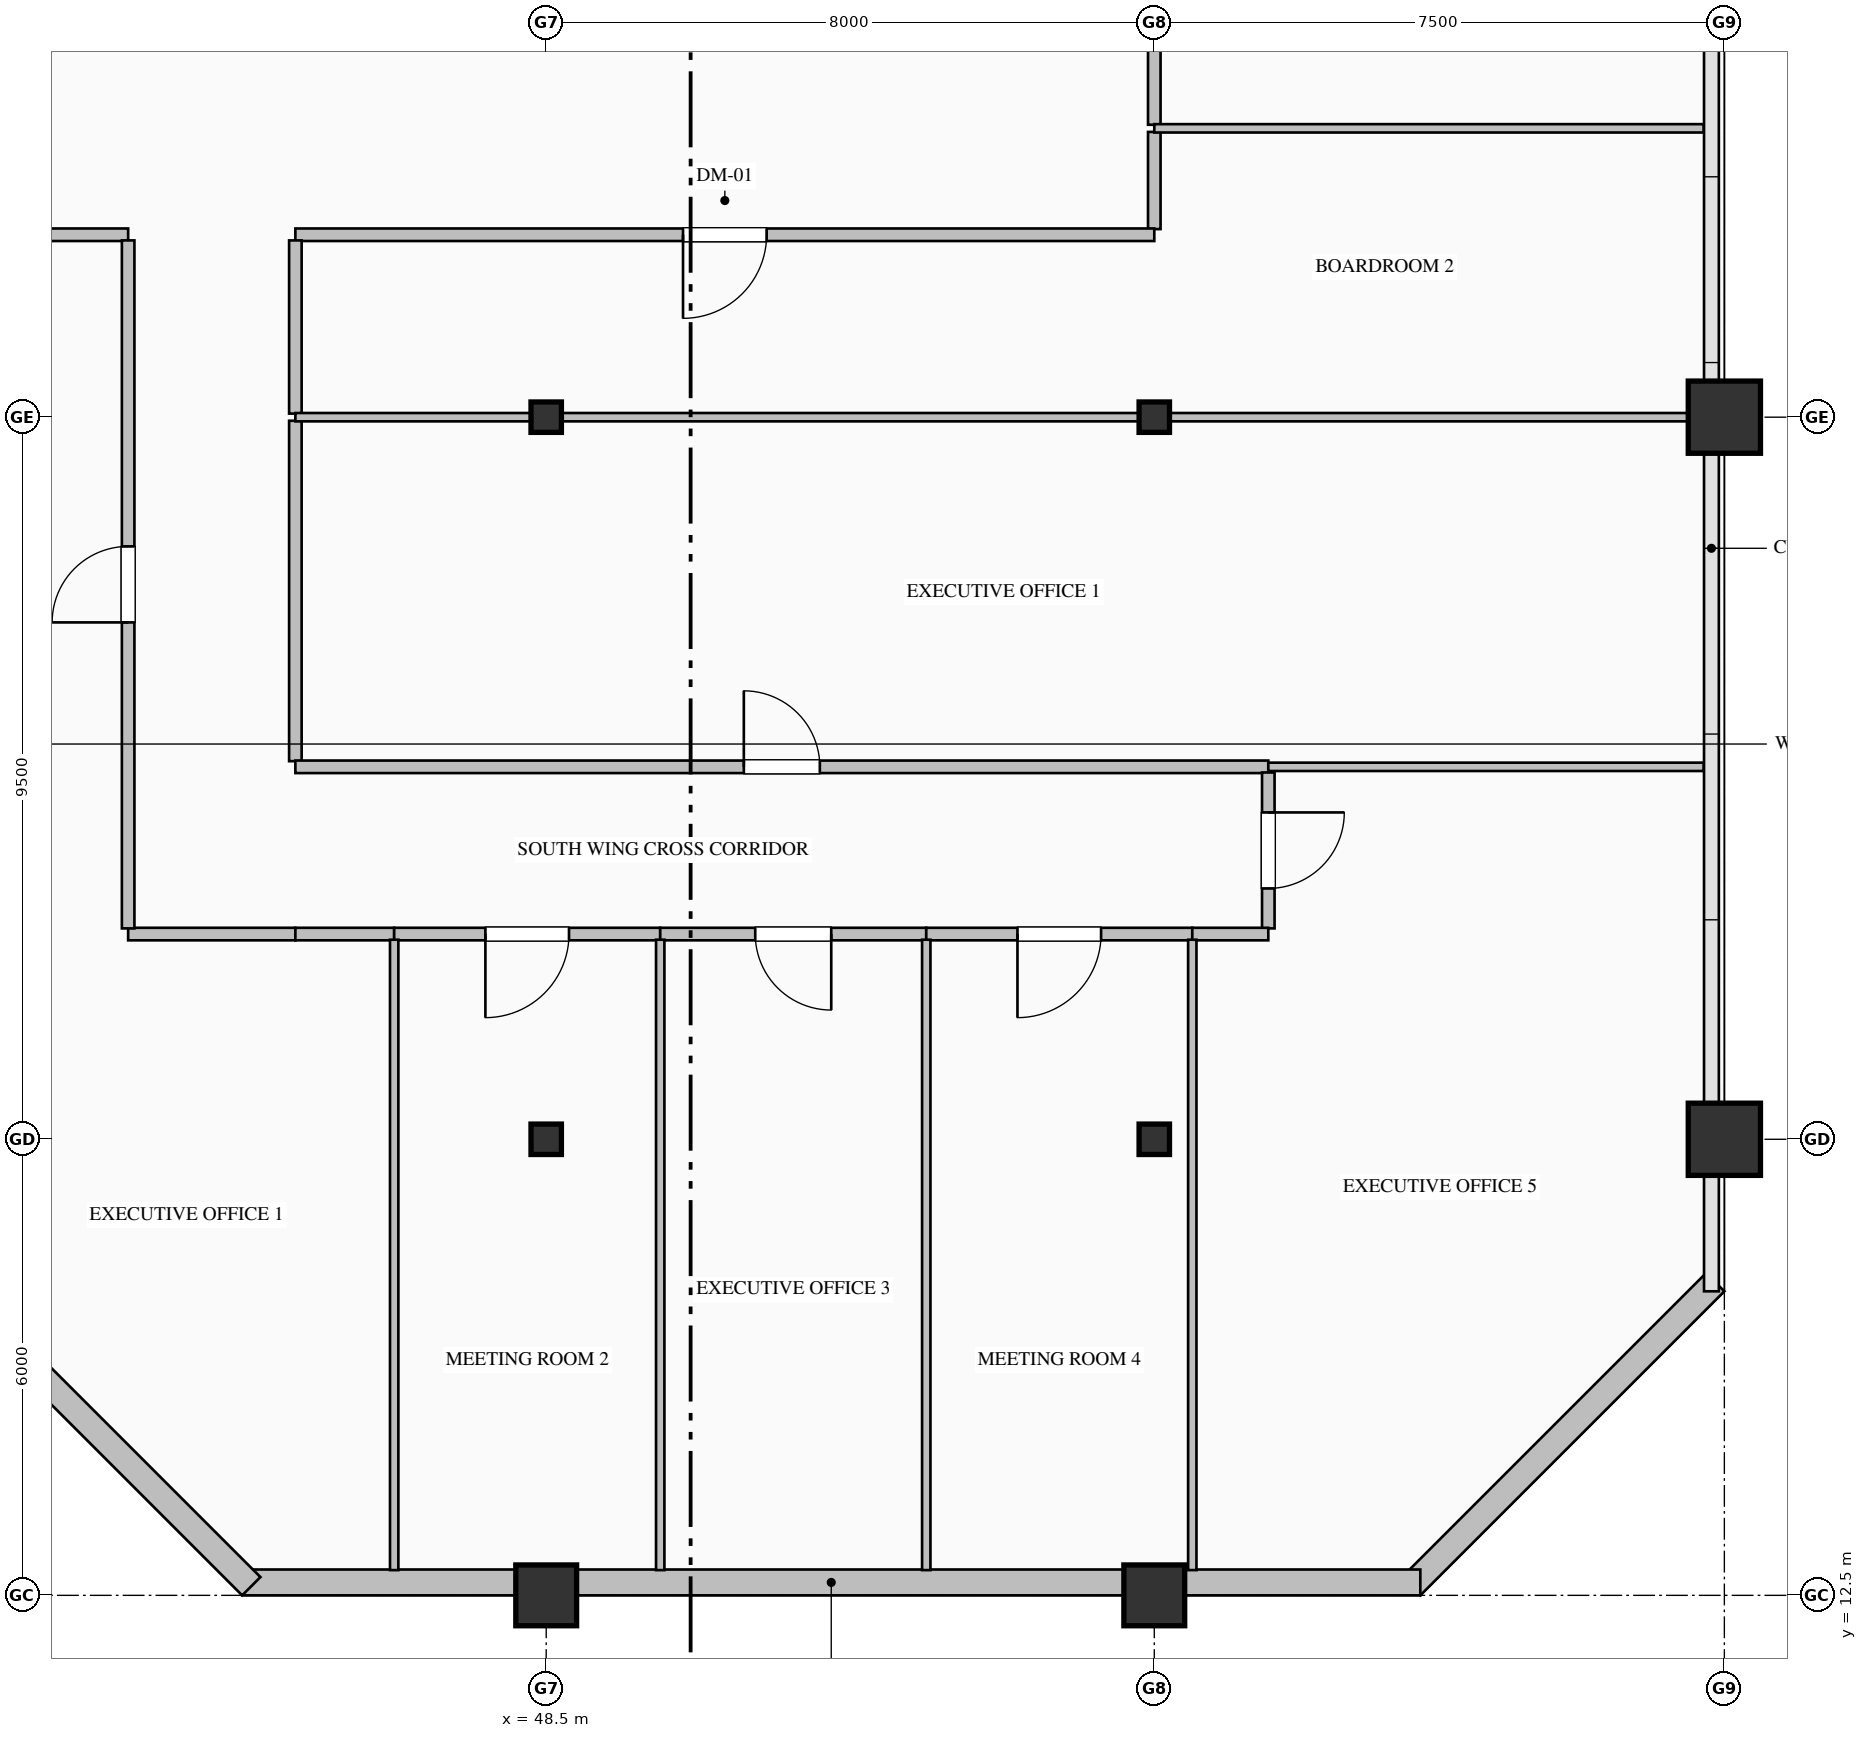
"""IFC4 building model, lengths in metres.
Left out: names, types, materials, properties, quantities, classifications, styles, units other than length and angle.
Written with IfcOpenShell. Run it as: python <this file> out.ifc"""

import sys

from ifc_helpers import new_model, si_unit, direction, frame, frame_2d, origin, origin_2d, place, context, subcontext, project, spatial, rectangle, hollow_rectangle, i_section, extrude, element, fill, save


model = new_model("IFC4")
c1 = context("Model", 3, precision=1e-05, world=origin(), true_north=direction((0.0, 1.0)))
c2 = subcontext(c1, "Body", "Model", "MODEL_VIEW")
j1 = project(units=[si_unit("LENGTHUNIT", "METRE"), si_unit("PLANEANGLEUNIT", "RADIAN")], contexts=[c1])
p1 = place(None, origin())
s1 = spatial("IfcSite", under=j1, at=p1, CompositionType="ELEMENT")
p2 = place(p1, origin())
s2 = spatial("IfcBuilding", under=s1, at=p2, CompositionType="ELEMENT")
p3 = place(p2, frame((0.0, 0.0, 213.8)))
s3 = spatial("IfcBuildingStorey", under=s2, at=p3, CompositionType="ELEMENT", Elevation=213.8)
p4 = place(p3, frame((48.5, 12.5, 0.0), z_axis=(0.0, 0.0, 1.0), x_axis=(1.0, 0.0, 0.0)))
e1 = element("IfcColumn", 1, at=p4, inside=s3, PredefinedType="COLUMN", context=c2, shape_type="SweptSolid", body=[
    extrude(hollow_rectangle(XDim=0.8, YDim=0.8, WallThickness=0.032, at=origin_2d()), origin(), (0.0, 0.0, 1.0), 4.0),
])
for number, where, z_axis, x_axis in (
    (2, (48.5, 18.5, 0.0), (0.0, 0.0, 1.0), (1.0, 0.0, 0.0)),
    (3, (48.5, 28.0, 0.0), (0.0, 0.0, 1.0), (1.0, 0.0, 0.0)),
):
    element("IfcColumn", number, at=place(p3, frame(where, z_axis=z_axis, x_axis=x_axis)), inside=s3, PredefinedType="COLUMN", context=c2, shape_type="SweptSolid", body=[
        extrude(i_section(OverallWidth=0.4, OverallDepth=0.4, WebThickness=0.013, FlangeThickness=0.021, FilletRadius=0.022, at=origin_2d()), origin(), (0.0, 0.0, 1.0), 4.0),
    ])
p5 = place(p3, frame((56.5, 12.5, 0.0), z_axis=(0.0, 0.0, 1.0), x_axis=(1.0, 0.0, 0.0)))
e4 = element("IfcColumn", 4, at=p5, inside=s3, PredefinedType="COLUMN", context=c2, shape_type="SweptSolid", body=[
    extrude(hollow_rectangle(XDim=0.8, YDim=0.8, WallThickness=0.032, at=origin_2d()), origin(), (0.0, 0.0, 1.0), 4.0),
])
for number, where, z_axis, x_axis in (
    (5, (56.5, 18.5, 0.0), (0.0, 0.0, 1.0), (1.0, 0.0, 0.0)),
    (6, (56.5, 28.0, 0.0), (0.0, 0.0, 1.0), (1.0, 0.0, 0.0)),
):
    element("IfcColumn", number, at=place(p3, frame(where, z_axis=z_axis, x_axis=x_axis)), inside=s3, PredefinedType="COLUMN", context=c2, shape_type="SweptSolid", body=[
        extrude(i_section(OverallWidth=0.4, OverallDepth=0.4, WebThickness=0.013, FlangeThickness=0.021, FilletRadius=0.022, at=origin_2d()), origin(), (0.0, 0.0, 1.0), 4.0),
    ])
for number, where, z_axis, x_axis in (
    (7, (64.0, 18.5, 0.0), (0.0, 0.0, 1.0), (1.0, 0.0, 0.0)),
    (8, (64.0, 28.0, 0.0), (0.0, 0.0, 1.0), (1.0, 0.0, 0.0)),
):
    element("IfcColumn", number, at=place(p3, frame(where, z_axis=z_axis, x_axis=x_axis)), inside=s3, PredefinedType="COLUMN", context=c2, shape_type="SweptSolid", body=[
        extrude(hollow_rectangle(XDim=0.95, YDim=0.95, WallThickness=0.036, at=origin_2d()), origin(), (0.0, 0.0, 1.0), 4.0),
    ])
p6 = place(p3, frame((63.88, 16.62, 0.0), z_axis=(0.0, 0.0, 1.0), x_axis=(-0.707106781187, -0.707106781187, 0.0)))
e9 = element("IfcWall", 9, at=p6, inside=s3, PredefinedType="SOLIDWALL", context=c2, shape_type="SweptSolid", body=[
    extrude(rectangle(XDim=5.657, YDim=0.34, at=frame_2d((2.828, 0.0))), origin(), (0.0, 0.0, 1.0), 3.775),
])
p7 = place(p3, frame((60.0, 12.67, 0.0), z_axis=(0.0, 0.0, 1.0), x_axis=(-1.0, 0.0, 0.0)))
e10 = element("IfcWall", 10, at=p7, inside=s3, PredefinedType="SOLIDWALL", context=c2, shape_type="SweptSolid", body=[
    extrude(rectangle(XDim=15.5, YDim=0.34, at=frame_2d((7.75, 0.0))), origin(), (0.0, 0.0, 1.0), 3.325),
])
p8 = place(p3, frame((44.62, 12.62, 0.0), z_axis=(0.0, 0.0, 1.0), x_axis=(-0.707106781187, 0.707106781187, 0.0)))
e11 = element("IfcWall", 11, at=p8, inside=s3, PredefinedType="SOLIDWALL", context=c2, shape_type="SweptSolid", body=[
    extrude(rectangle(XDim=5.657, YDim=0.34, at=frame_2d((2.828, 0.0))), origin(), (0.0, 0.0, 1.0), 3.775),
])
p9 = place(p3, frame((56.5, 31.753, 0.0), z_axis=(0.0, 0.0, 1.0), x_axis=(0.0, -1.0, 0.0)))
e12 = element("IfcWall", 12, at=p9, inside=s3, PredefinedType="PARTITIONING", context=c2, shape_type="SweptSolid", body=[
    extrude(rectangle(XDim=1.278, YDim=0.165, at=frame_2d((0.639, 0.0))), origin(), (0.0, 0.0, 1.0), 3.179),
])
p10 = place(p3, frame((56.5, 30.4, 0.0), z_axis=(0.0, 0.0, 1.0), x_axis=(-1.0, 0.0, 0.0)))
e13 = element("IfcWall", 13, at=p10, inside=s3, PredefinedType="PARTITIONING", context=c2, shape_type="SweptSolid", body=[
    extrude(rectangle(XDim=11.3, YDim=0.165, at=frame_2d((5.65, 0.0))), origin(), (0.0, 0.0, 1.0), 3.775),
])
p11 = place(p10, frame((5.1, 0.0, 0.0)))
e14 = element("IfcOpeningElement", 14, at=p11, cuts=e13, PredefinedType="OPENING", context=c2, shape_type="SweptSolid", body=[
    extrude(rectangle(XDim=1.1, YDim=2.2, at=frame_2d((0.55, 1.1))), frame((0.0, 0.093, 0.0), z_axis=(0.0, -1.0, 0.0), x_axis=(1.0, 0.0, 0.0)), (0.0, 0.0, 1.0), 0.185),
])
p12 = place(p3, frame((56.5, 36.0, 0.0), z_axis=(0.0, 0.0, 1.0), x_axis=(0.0, -1.0, 0.0)))
e15 = element("IfcWall", 15, at=p12, inside=s3, PredefinedType="PARTITIONING", context=c2, shape_type="SweptSolid", body=[
    extrude(rectangle(XDim=4.153, YDim=0.165, at=frame_2d((2.077, 0.0))), origin(), (0.0, 0.0, 1.0), 3.179),
])
p13 = place(p12, frame((1.576, 0.0, 0.0)))
e16 = element("IfcOpeningElement", 16, at=p13, cuts=e15, PredefinedType="OPENING", context=c2, shape_type="SweptSolid", body=[
    extrude(rectangle(XDim=1.0, YDim=2.15, at=frame_2d((0.5, 1.075))), frame((0.0, 0.093, 0.0), z_axis=(0.0, -1.0, 0.0), x_axis=(1.0, 0.0, 0.0)), (0.0, 0.0, 1.0), 0.185),
])
p14 = place(p3, frame((43.0, 30.4, 0.0), z_axis=(0.0, 0.0, 1.0), x_axis=(-1.0, 0.0, 0.0)))
e17 = element("IfcWall", 17, at=p14, inside=s3, PredefinedType="PARTITIONING", context=c2, shape_type="SweptSolid", body=[
    extrude(rectangle(XDim=2.5, YDim=0.165, at=frame_2d((1.25, 0.0))), origin(), (0.0, 0.0, 1.0), 3.775),
])
p15 = place(p3, frame((45.2, 27.953, 0.0), z_axis=(0.0, 0.0, 1.0), x_axis=(0.0, -1.0, 0.0)))
e18 = element("IfcWall", 18, at=p15, inside=s3, PredefinedType="PARTITIONING", context=c2, shape_type="SweptSolid", body=[
    extrude(rectangle(XDim=4.478, YDim=0.165, at=frame_2d((2.239, 0.0))), origin(), (0.0, 0.0, 1.0), 3.775),
])
p16 = place(p3, frame((45.2, 30.325, 0.0), z_axis=(0.0, 0.0, 1.0), x_axis=(0.0, -1.0, 0.0)))
e19 = element("IfcWall", 19, at=p16, inside=s3, PredefinedType="PARTITIONING", context=c2, shape_type="SweptSolid", body=[
    extrude(rectangle(XDim=2.278, YDim=0.165, at=frame_2d((1.139, 0.0))), origin(), (0.0, 0.0, 1.0), 3.775),
])
p17 = place(p3, frame((45.2, 21.2, 0.0), z_axis=(0.0, 0.0, 1.0), x_axis=(-1.0, 0.0, 0.0)))
e20 = element("IfcWall", 20, at=p17, inside=s3, PredefinedType="PARTITIONING", context=c2, shape_type="SweptSolid", body=[
    extrude(rectangle(XDim=2.2, YDim=0.165, at=frame_2d((1.1, 0.0))), origin(), (0.0, 0.0, 1.0), 3.775),
])
p18 = place(p3, frame((43.0, 21.274, 0.0), z_axis=(0.0, 0.0, 1.0), x_axis=(0.0, 1.0, 0.0)))
e21 = element("IfcWall", 21, at=p18, inside=s3, PredefinedType="PARTITIONING", context=c2, shape_type="SweptSolid", body=[
    extrude(rectangle(XDim=9.051, YDim=0.165, at=frame_2d((4.525, 0.0))), origin(), (0.0, 0.0, 1.0), 3.775),
])
p19 = place(p18, frame((4.025, 0.0, 0.0)))
e22 = element("IfcOpeningElement", 22, at=p19, cuts=e21, PredefinedType="OPENING", context=c2, shape_type="SweptSolid", body=[
    extrude(rectangle(XDim=1.0, YDim=2.15, at=frame_2d((0.5, 1.075))), frame((0.0, 0.093, 0.0), z_axis=(0.0, -1.0, 0.0), x_axis=(1.0, 0.0, 0.0)), (0.0, 0.0, 1.0), 0.185),
])
p20 = place(p3, frame((45.2, 23.4, 0.0), z_axis=(0.0, 0.0, 1.0), x_axis=(1.0, 0.0, 0.0)))
e23 = element("IfcWall", 23, at=p20, inside=s3, PredefinedType="PARTITIONING", context=c2, shape_type="SweptSolid", body=[
    extrude(rectangle(XDim=12.8, YDim=0.165, at=frame_2d((6.4, 0.0))), origin(), (0.0, 0.0, 1.0), 3.467),
])
p21 = place(p20, frame((5.9, 0.0, 0.0)))
e24 = element("IfcOpeningElement", 24, at=p21, cuts=e23, PredefinedType="OPENING", context=c2, shape_type="SweptSolid", body=[
    extrude(rectangle(XDim=1.0, YDim=2.15, at=frame_2d((0.5, 1.075))), frame((0.0, 0.093, 0.0), z_axis=(0.0, -1.0, 0.0), x_axis=(1.0, 0.0, 0.0)), (0.0, 0.0, 1.0), 0.185),
])
p22 = place(p3, frame((46.5, 21.2, 0.0), z_axis=(0.0, 0.0, 1.0), x_axis=(-1.0, 0.0, 0.0)))
e25 = element("IfcWall", 25, at=p22, inside=s3, PredefinedType="PARTITIONING", context=c2, shape_type="SweptSolid", body=[
    extrude(rectangle(XDim=1.3, YDim=0.165, at=frame_2d((0.65, 0.0))), origin(), (0.0, 0.0, 1.0), 3.775),
])
p23 = place(p3, frame((50.0, 21.2, 0.0), z_axis=(0.0, 0.0, 1.0), x_axis=(-1.0, 0.0, 0.0)))
e26 = element("IfcWall", 26, at=p23, inside=s3, PredefinedType="PARTITIONING", context=c2, shape_type="SweptSolid", body=[
    extrude(rectangle(XDim=3.5, YDim=0.165, at=frame_2d((1.75, 0.0))), origin(), (0.0, 0.0, 1.0), 3.775),
])
p24 = place(p23, frame((1.2, 0.0, 0.0)))
e27 = element("IfcOpeningElement", 27, at=p24, cuts=e26, PredefinedType="OPENING", context=c2, shape_type="SweptSolid", body=[
    extrude(rectangle(XDim=1.1, YDim=2.2, at=frame_2d((0.55, 1.1))), frame((0.0, 0.093, 0.0), z_axis=(0.0, -1.0, 0.0), x_axis=(1.0, 0.0, 0.0)), (0.0, 0.0, 1.0), 0.185),
])
p25 = place(p3, frame((53.5, 21.2, 0.0), z_axis=(0.0, 0.0, 1.0), x_axis=(-1.0, 0.0, 0.0)))
e28 = element("IfcWall", 28, at=p25, inside=s3, PredefinedType="PARTITIONING", context=c2, shape_type="SweptSolid", body=[
    extrude(rectangle(XDim=3.5, YDim=0.165, at=frame_2d((1.75, 0.0))), origin(), (0.0, 0.0, 1.0), 3.775),
])
p26 = place(p25, frame((1.25, 0.0, 0.0)))
e29 = element("IfcOpeningElement", 29, at=p26, cuts=e28, PredefinedType="OPENING", context=c2, shape_type="SweptSolid", body=[
    extrude(rectangle(XDim=1.0, YDim=2.15, at=frame_2d((0.5, 1.075))), frame((0.0, 0.093, 0.0), z_axis=(0.0, -1.0, 0.0), x_axis=(1.0, 0.0, 0.0)), (0.0, 0.0, 1.0), 0.185),
])
p27 = place(p3, frame((57.0, 21.2, 0.0), z_axis=(0.0, 0.0, 1.0), x_axis=(-1.0, 0.0, 0.0)))
e30 = element("IfcWall", 30, at=p27, inside=s3, PredefinedType="PARTITIONING", context=c2, shape_type="SweptSolid", body=[
    extrude(rectangle(XDim=3.5, YDim=0.165, at=frame_2d((1.75, 0.0))), origin(), (0.0, 0.0, 1.0), 3.775),
])
p28 = place(p27, frame((1.2, 0.0, 0.0)))
e31 = element("IfcOpeningElement", 31, at=p28, cuts=e30, PredefinedType="OPENING", context=c2, shape_type="SweptSolid", body=[
    extrude(rectangle(XDim=1.1, YDim=2.2, at=frame_2d((0.55, 1.1))), frame((0.0, 0.093, 0.0), z_axis=(0.0, -1.0, 0.0), x_axis=(1.0, 0.0, 0.0)), (0.0, 0.0, 1.0), 0.185),
])
p29 = place(p3, frame((58.0, 23.325, 0.0), z_axis=(0.0, 0.0, 1.0), x_axis=(0.0, -1.0, 0.0)))
e32 = element("IfcWall", 32, at=p29, inside=s3, PredefinedType="PARTITIONING", context=c2, shape_type="SweptSolid", body=[
    extrude(rectangle(XDim=2.051, YDim=0.165, at=frame_2d((1.025, 0.0))), origin(), (0.0, 0.0, 1.0), 3.775),
])
p30 = place(p29, frame((0.525, 0.0, 0.0)))
e33 = element("IfcOpeningElement", 33, at=p30, cuts=e32, PredefinedType="OPENING", context=c2, shape_type="SweptSolid", body=[
    extrude(rectangle(XDim=1.0, YDim=2.15, at=frame_2d((0.5, 1.075))), frame((0.0, 0.093, 0.0), z_axis=(0.0, -1.0, 0.0), x_axis=(1.0, 0.0, 0.0)), (0.0, 0.0, 1.0), 0.185),
])
p31 = place(p3, frame((58.0, 21.2, 0.0), z_axis=(0.0, 0.0, 1.0), x_axis=(-1.0, 0.0, 0.0)))
e34 = element("IfcWall", 34, at=p31, inside=s3, PredefinedType="PARTITIONING", context=c2, shape_type="SweptSolid", body=[
    extrude(rectangle(XDim=1.0, YDim=0.165, at=frame_2d((0.5, 0.0))), origin(), (0.0, 0.0, 1.0), 3.775),
])
p32 = place(p3, frame((45.2, 28.0, 0.0), z_axis=(0.0, 0.0, 1.0), x_axis=(1.0, 0.0, 0.0)))
e35 = element("IfcWall", 35, at=p32, inside=s3, PredefinedType="MOVABLE", context=c2, shape_type="SweptSolid", body=[
    extrude(rectangle(XDim=18.528, YDim=0.11, at=frame_2d((9.264, 0.0))), origin(), (0.0, 0.0, 1.0), 3.179),
])
p33 = place(p3, frame((63.728, 23.4, 0.0), z_axis=(0.0, 0.0, 1.0), x_axis=(-1.0, 0.0, 0.0)))
e36 = element("IfcWall", 36, at=p33, inside=s3, PredefinedType="MOVABLE", context=c2, shape_type="SweptSolid", body=[
    extrude(rectangle(XDim=5.728, YDim=0.11, at=frame_2d((2.864, 0.0))), origin(), (0.0, 0.0, 1.0), 3.775),
])
p34 = place(p3, frame((56.5, 31.8, 0.0), z_axis=(0.0, 0.0, 1.0), x_axis=(1.0, 0.0, 0.0)))
e37 = element("IfcWall", 37, at=p34, inside=s3, PredefinedType="MOVABLE", context=c2, shape_type="SweptSolid", body=[
    extrude(rectangle(XDim=7.228, YDim=0.11, at=frame_2d((3.614, 0.0))), origin(), (0.0, 0.0, 1.0), 3.775),
])
for number, where, z_axis, x_axis in (
    (38, (46.5, 21.125, 0.0), (0.0, 0.0, 1.0), (0.0, -1.0, 0.0)),
    (39, (50.0, 21.125, 0.0), (0.0, 0.0, 1.0), (0.0, -1.0, 0.0)),
    (40, (53.5, 21.125, 0.0), (0.0, 0.0, 1.0), (0.0, -1.0, 0.0)),
    (41, (57.0, 21.125, 0.0), (0.0, 0.0, 1.0), (0.0, -1.0, 0.0)),
):
    element("IfcWall", number, at=place(p3, frame(where, z_axis=z_axis, x_axis=x_axis)), inside=s3, PredefinedType="MOVABLE", context=c2, shape_type="SweptSolid", body=[
        extrude(rectangle(XDim=8.293, YDim=0.11, at=frame_2d((4.147, 0.0))), origin(), (0.0, 0.0, 1.0), 3.775),
    ])
p35 = place(p21, origin())
e42 = element("IfcDoor", 42, at=p35, inside=s3, OperationType="SINGLE_SWING_LEFT", PredefinedType="DOOR", context=c2, shape_type="SweptSolid", body=[
    extrude(rectangle(XDim=1.0, YDim=2.15, at=frame_2d((0.5, 1.075))), frame((0.0, 0.025, 0.0), z_axis=(0.0, -1.0, 0.0), x_axis=(1.0, 0.0, 0.0)), (0.0, 0.0, 1.0), 0.05),
])
fill(e24, e42)
p36 = place(p11, origin())
e43 = element("IfcDoor", 43, at=p36, inside=s3, OperationType="SINGLE_SWING_RIGHT", PredefinedType="DOOR", context=c2, shape_type="SweptSolid", body=[
    extrude(rectangle(XDim=1.1, YDim=2.2, at=frame_2d((0.55, 1.1))), frame((0.0, 0.025, 0.0), z_axis=(0.0, -1.0, 0.0), x_axis=(1.0, 0.0, 0.0)), (0.0, 0.0, 1.0), 0.05),
])
fill(e14, e43)
p37 = place(p19, origin())
e44 = element("IfcDoor", 44, at=p37, inside=s3, OperationType="SINGLE_SWING_LEFT", PredefinedType="DOOR", context=c2, shape_type="SweptSolid", body=[
    extrude(rectangle(XDim=1.0, YDim=2.15, at=frame_2d((0.5, 1.075))), frame((0.0, 0.025, 0.0), z_axis=(0.0, -1.0, 0.0), x_axis=(1.0, 0.0, 0.0)), (0.0, 0.0, 1.0), 0.05),
])
fill(e22, e44)
p38 = place(p24, origin())
e45 = element("IfcDoor", 45, at=p38, inside=s3, OperationType="SINGLE_SWING_RIGHT", PredefinedType="DOOR", context=c2, shape_type="SweptSolid", body=[
    extrude(rectangle(XDim=1.1, YDim=2.2, at=frame_2d((0.55, 1.1))), frame((0.0, 0.025, 0.0), z_axis=(0.0, -1.0, 0.0), x_axis=(1.0, 0.0, 0.0)), (0.0, 0.0, 1.0), 0.05),
])
fill(e27, e45)
p39 = place(p26, origin())
e46 = element("IfcDoor", 46, at=p39, inside=s3, OperationType="SINGLE_SWING_LEFT", PredefinedType="DOOR", context=c2, shape_type="SweptSolid", body=[
    extrude(rectangle(XDim=1.0, YDim=2.15, at=frame_2d((0.5, 1.075))), frame((0.0, 0.025, 0.0), z_axis=(0.0, -1.0, 0.0), x_axis=(1.0, 0.0, 0.0)), (0.0, 0.0, 1.0), 0.05),
])
fill(e29, e46)
p40 = place(p28, origin())
e47 = element("IfcDoor", 47, at=p40, inside=s3, OperationType="SINGLE_SWING_RIGHT", PredefinedType="DOOR", context=c2, shape_type="SweptSolid", body=[
    extrude(rectangle(XDim=1.1, YDim=2.2, at=frame_2d((0.55, 1.1))), frame((0.0, 0.025, 0.0), z_axis=(0.0, -1.0, 0.0), x_axis=(1.0, 0.0, 0.0)), (0.0, 0.0, 1.0), 0.05),
])
fill(e31, e47)
p41 = place(p30, origin())
e48 = element("IfcDoor", 48, at=p41, inside=s3, OperationType="SINGLE_SWING_LEFT", PredefinedType="DOOR", context=c2, shape_type="SweptSolid", body=[
    extrude(rectangle(XDim=1.0, YDim=2.15, at=frame_2d((0.5, 1.075))), frame((0.0, 0.025, 0.0), z_axis=(0.0, -1.0, 0.0), x_axis=(1.0, 0.0, 0.0)), (0.0, 0.0, 1.0), 0.05),
])
fill(e33, e48)
save(model, sys.argv[1])
